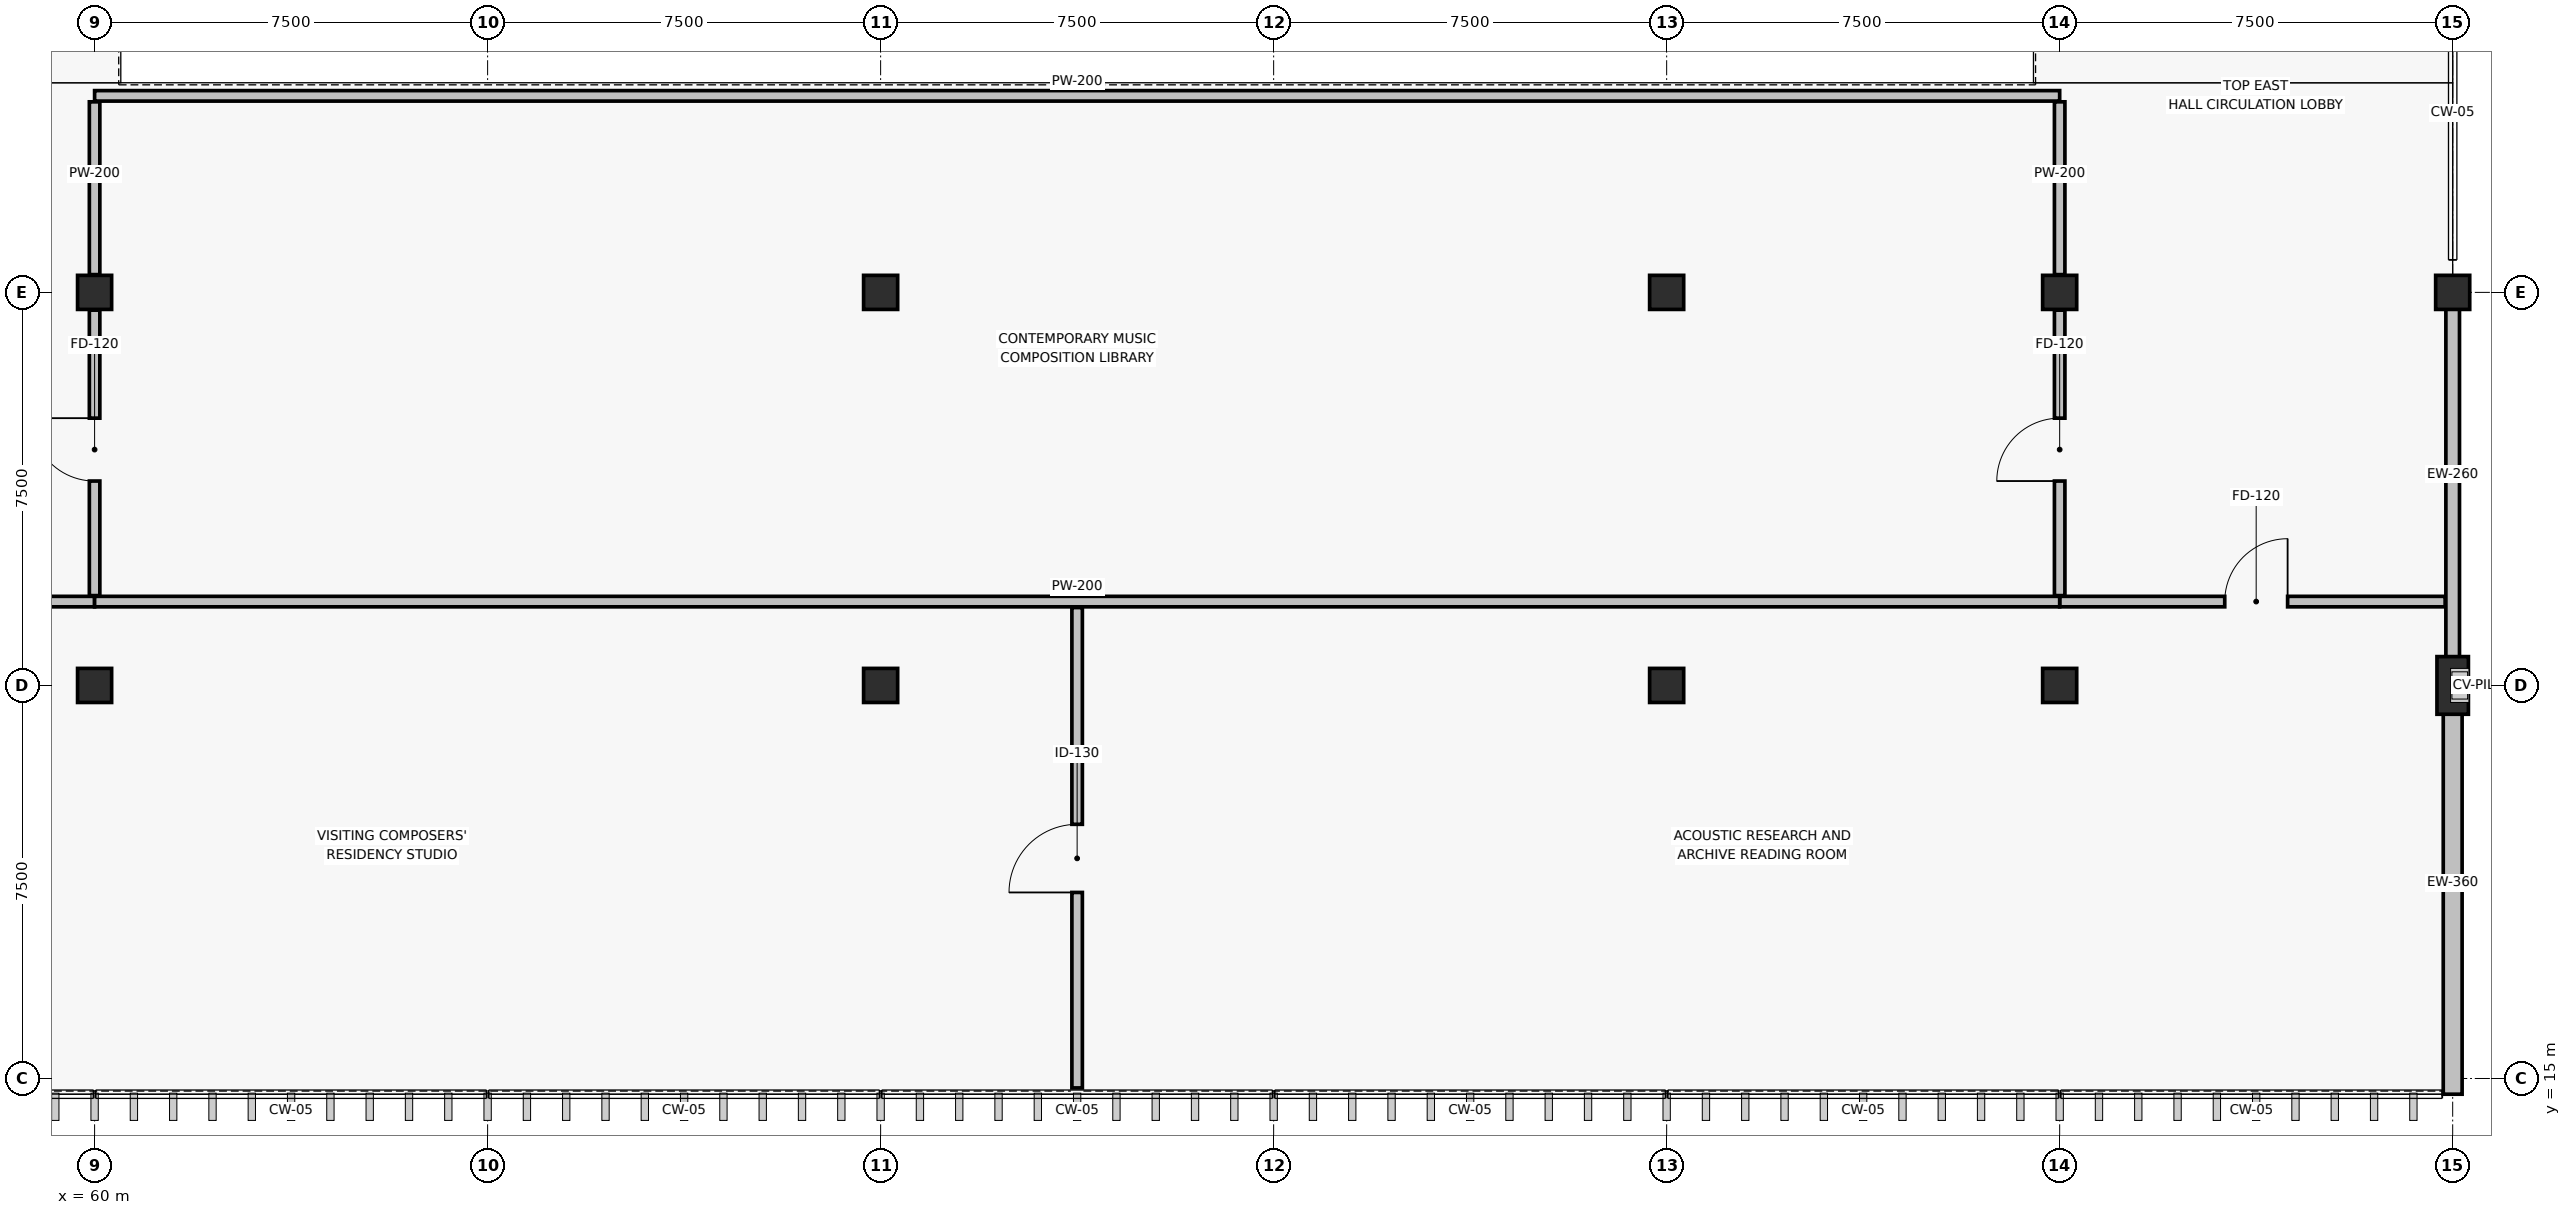
"""IFC4 building model, lengths in metres.
Left out: names, types, materials, properties, quantities, classifications, styles, units other than length and angle.
Written with IfcOpenShell. Run it as: python <this file> out.ifc"""

import sys

from ifc_helpers import new_model, si_unit, direction, frame, frame_2d, origin, origin_2d, place, context, subcontext, project, spatial, rectangle, extrude, element, fill, save


model = new_model("IFC4")
c1 = context("Model", 3, precision=1e-05, world=origin(), true_north=direction((0.0, 1.0)))
c2 = subcontext(c1, "Body", "Model", "MODEL_VIEW")
j1 = project(units=[si_unit("LENGTHUNIT", "METRE"), si_unit("PLANEANGLEUNIT", "RADIAN")], contexts=[c1])
p1 = place(None, origin())
s1 = spatial("IfcSite", under=j1, at=p1, CompositionType="ELEMENT")
p2 = place(p1, origin())
s2 = spatial("IfcBuilding", under=s1, at=p2, CompositionType="ELEMENT")
p3 = place(p2, frame((0.0, 0.0, 21.0)))
s3 = spatial("IfcBuildingStorey", under=s2, at=p3, CompositionType="ELEMENT", Elevation=21.0)
for number, where, z_axis, x_axis in (
    (1, (60.0, 22.5, 0.0), (0.0, 0.0, 1.0), (1.0, 0.0, 0.0)),
    (2, (60.0, 30.0, 0.0), (0.0, 0.0, 1.0), (1.0, 0.0, 0.0)),
    (3, (75.0, 22.5, 0.0), (0.0, 0.0, 1.0), (1.0, 0.0, 0.0)),
    (4, (75.0, 30.0, 0.0), (0.0, 0.0, 1.0), (1.0, 0.0, 0.0)),
    (5, (90.0, 22.5, 0.0), (0.0, 0.0, 1.0), (1.0, 0.0, 0.0)),
    (6, (90.0, 30.0, 0.0), (0.0, 0.0, 1.0), (1.0, 0.0, 0.0)),
    (7, (97.5, 22.5, 0.0), (0.0, 0.0, 1.0), (1.0, 0.0, 0.0)),
    (8, (97.5, 30.0, 0.0), (0.0, 0.0, 1.0), (1.0, 0.0, 0.0)),
):
    element("IfcColumn", number, at=place(p3, frame(where, z_axis=z_axis, x_axis=x_axis)), inside=s3, PredefinedType="COLUMN", context=c2, shape_type="SweptSolid", body=[
        extrude(rectangle(XDim=0.65, YDim=0.65, at=origin_2d()), origin(), (0.0, 0.0, 1.0), 4.2),
    ])
p4 = place(p3, frame((105.0, 22.5, 0.0), z_axis=(0.0, 0.0, 1.0), x_axis=(1.0, 0.0, 0.0)))
e9 = element("IfcColumn", 9, at=p4, inside=s3, PredefinedType="COLUMN", context=c2, shape_type="SweptSolid", body=[
    extrude(rectangle(XDim=0.6, YDim=1.1, at=origin_2d()), origin(), (0.0, 0.0, 1.0), 4.2),
])
p5 = place(p3, frame((105.0, 30.0, 0.0), z_axis=(0.0, 0.0, 1.0), x_axis=(1.0, 0.0, 0.0)))
e10 = element("IfcColumn", 10, at=p5, inside=s3, PredefinedType="COLUMN", context=c2, shape_type="SweptSolid", body=[
    extrude(rectangle(XDim=0.65, YDim=0.65, at=origin_2d()), origin(), (0.0, 0.0, 1.0), 4.2),
])
p6 = place(p3, frame((105.0, 14.7, 0.0), z_axis=(0.0, 0.0, 1.0), x_axis=(0.0, 1.0, 0.0)))
e11 = element("IfcWall", 11, at=p6, inside=s3, PredefinedType="SOLIDWALL", context=c2, shape_type="SweptSolid", body=[
    extrude(rectangle(XDim=7.5, YDim=0.36, at=frame_2d((3.75, 0.0))), origin(), (0.0, 0.0, 1.0), 3.32),
])
p7 = place(p3, frame((105.0, 22.8, 0.0), z_axis=(0.0, 0.0, 1.0), x_axis=(0.0, 1.0, 0.0)))
e12 = element("IfcWall", 12, at=p7, inside=s3, PredefinedType="SOLIDWALL", context=c2, shape_type="SweptSolid", body=[
    extrude(rectangle(XDim=6.9, YDim=0.26, at=frame_2d((3.45, 0.0))), origin(), (0.0, 0.0, 1.0), 3.04),
])
p8 = place(p3, frame((52.644, 24.1, 0.0), z_axis=(0.0, 0.0, 1.0), x_axis=(1.0, 0.0, 0.0)))
e13 = element("IfcWall", 13, at=p8, inside=s3, PredefinedType="PARTITIONING", context=c2, shape_type="SweptSolid", body=[
    extrude(rectangle(XDim=7.356, YDim=0.2, at=frame_2d((3.678, 0.0))), origin(), (0.0, 0.0, 1.0), 2.69),
])
p9 = place(p8, frame((3.006, 0.0, 0.0)))
e14 = element("IfcOpeningElement", 14, at=p9, cuts=e13, PredefinedType="OPENING", context=c2, shape_type="SweptSolid", body=[
    extrude(rectangle(XDim=1.2, YDim=2.15, at=frame_2d((0.6, 1.075))), frame((0.0, 0.11, 0.0), z_axis=(0.0, -1.0, 0.0), x_axis=(1.0, 0.0, 0.0)), (0.0, 0.0, 1.0), 0.22),
])
p10 = place(p3, frame((97.5, 24.1, 0.0), z_axis=(0.0, 0.0, 1.0), x_axis=(1.0, 0.0, 0.0)))
e15 = element("IfcWall", 15, at=p10, inside=s3, PredefinedType="PARTITIONING", context=c2, shape_type="SweptSolid", body=[
    extrude(rectangle(XDim=7.356, YDim=0.2, at=frame_2d((3.678, 0.0))), origin(), (0.0, 0.0, 1.0), 2.69),
])
p11 = place(p10, frame((3.15, 0.0, 0.0)))
e16 = element("IfcOpeningElement", 16, at=p11, cuts=e15, PredefinedType="OPENING", context=c2, shape_type="SweptSolid", body=[
    extrude(rectangle(XDim=1.2, YDim=2.15, at=frame_2d((0.6, 1.075))), frame((0.0, 0.11, 0.0), z_axis=(0.0, -1.0, 0.0), x_axis=(1.0, 0.0, 0.0)), (0.0, 0.0, 1.0), 0.22),
])
for number, where, z_axis, x_axis in (
    (17, (60.0, 24.1, 0.0), (0.0, 0.0, 1.0), (1.0, 0.0, 0.0)),
    (18, (60.0, 33.75, 0.0), (0.0, 0.0, 1.0), (1.0, 0.0, 0.0)),
):
    element("IfcWall", number, at=place(p3, frame(where, z_axis=z_axis, x_axis=x_axis)), inside=s3, PredefinedType="PARTITIONING", context=c2, shape_type="SweptSolid", body=[
        extrude(rectangle(XDim=37.5, YDim=0.2, at=frame_2d((18.75, 0.0))), origin(), (0.0, 0.0, 1.0), 2.69),
    ])
p12 = place(p3, frame((78.75, 14.82, 0.0), z_axis=(0.0, 0.0, 1.0), x_axis=(0.0, 1.0, 0.0)))
e19 = element("IfcWall", 19, at=p12, inside=s3, PredefinedType="PARTITIONING", context=c2, shape_type="SweptSolid", body=[
    extrude(rectangle(XDim=9.166, YDim=0.2, at=frame_2d((4.583, 0.0))), origin(), (0.0, 0.0, 1.0), 2.99),
])
p13 = place(p12, frame((3.73, 0.0, 0.0)))
e20 = element("IfcOpeningElement", 20, at=p13, cuts=e19, PredefinedType="OPENING", context=c2, shape_type="SweptSolid", body=[
    extrude(rectangle(XDim=1.3, YDim=2.15, at=frame_2d((0.65, 1.075))), frame((0.0, 0.11, 0.0), z_axis=(0.0, -1.0, 0.0), x_axis=(1.0, 0.0, 0.0)), (0.0, 0.0, 1.0), 0.22),
])
p14 = place(p3, frame((60.0, 24.214, 0.0), z_axis=(0.0, 0.0, 1.0), x_axis=(0.0, 1.0, 0.0)))
e21 = element("IfcWall", 21, at=p14, inside=s3, PredefinedType="PARTITIONING", context=c2, shape_type="SweptSolid", body=[
    extrude(rectangle(XDim=5.447, YDim=0.2, at=frame_2d((2.723, 0.0))), origin(), (0.0, 0.0, 1.0), 2.69),
])
p15 = place(p14, frame((2.186, 0.0, 0.0)))
e22 = element("IfcOpeningElement", 22, at=p15, cuts=e21, PredefinedType="OPENING", context=c2, shape_type="SweptSolid", body=[
    extrude(rectangle(XDim=1.2, YDim=2.15, at=frame_2d((0.6, 1.075))), frame((0.0, 0.11, 0.0), z_axis=(0.0, -1.0, 0.0), x_axis=(1.0, 0.0, 0.0)), (0.0, 0.0, 1.0), 0.22),
])
p16 = place(p3, frame((60.0, 30.339, 0.0), z_axis=(0.0, 0.0, 1.0), x_axis=(0.0, 1.0, 0.0)))
e23 = element("IfcWall", 23, at=p16, inside=s3, PredefinedType="PARTITIONING", context=c2, shape_type="SweptSolid", body=[
    extrude(rectangle(XDim=3.297, YDim=0.2, at=frame_2d((1.648, 0.0))), origin(), (0.0, 0.0, 1.0), 2.69),
])
p17 = place(p3, frame((97.5, 24.214, 0.0), z_axis=(0.0, 0.0, 1.0), x_axis=(0.0, 1.0, 0.0)))
e24 = element("IfcWall", 24, at=p17, inside=s3, PredefinedType="PARTITIONING", context=c2, shape_type="SweptSolid", body=[
    extrude(rectangle(XDim=5.447, YDim=0.2, at=frame_2d((2.723, 0.0))), origin(), (0.0, 0.0, 1.0), 2.69),
])
p18 = place(p17, frame((2.186, 0.0, 0.0)))
e25 = element("IfcOpeningElement", 25, at=p18, cuts=e24, PredefinedType="OPENING", context=c2, shape_type="SweptSolid", body=[
    extrude(rectangle(XDim=1.2, YDim=2.15, at=frame_2d((0.6, 1.075))), frame((0.0, 0.11, 0.0), z_axis=(0.0, -1.0, 0.0), x_axis=(1.0, 0.0, 0.0)), (0.0, 0.0, 1.0), 0.22),
])
p19 = place(p3, frame((97.5, 30.339, 0.0), z_axis=(0.0, 0.0, 1.0), x_axis=(0.0, 1.0, 0.0)))
e26 = element("IfcWall", 26, at=p19, inside=s3, PredefinedType="PARTITIONING", context=c2, shape_type="SweptSolid", body=[
    extrude(rectangle(XDim=3.297, YDim=0.2, at=frame_2d((1.648, 0.0))), origin(), (0.0, 0.0, 1.0), 2.69),
])
p20 = place(p11, origin())
e27 = element("IfcDoor", 27, at=p20, inside=s3, OperationType="SINGLE_SWING_RIGHT", PredefinedType="DOOR", context=c2, shape_type="SweptSolid", body=[
    extrude(rectangle(XDim=1.2, YDim=2.15, at=frame_2d((0.6, 1.075))), frame((0.0, 0.025, 0.0), z_axis=(0.0, -1.0, 0.0), x_axis=(1.0, 0.0, 0.0)), (0.0, 0.0, 1.0), 0.05),
])
fill(e16, e27)
p21 = place(p13, origin())
e28 = element("IfcDoor", 28, at=p21, inside=s3, OperationType="SINGLE_SWING_LEFT", PredefinedType="DOOR", context=c2, shape_type="SweptSolid", body=[
    extrude(rectangle(XDim=1.3, YDim=2.15, at=frame_2d((0.65, 1.075))), frame((0.0, 0.025, 0.0), z_axis=(0.0, -1.0, 0.0), x_axis=(1.0, 0.0, 0.0)), (0.0, 0.0, 1.0), 0.05),
])
fill(e20, e28)
p22 = place(p15, origin())
e29 = element("IfcDoor", 29, at=p22, inside=s3, OperationType="SINGLE_SWING_RIGHT", PredefinedType="DOOR", context=c2, shape_type="SweptSolid", body=[
    extrude(rectangle(XDim=1.2, YDim=2.15, at=frame_2d((0.6, 1.075))), frame((0.0, 0.025, 0.0), z_axis=(0.0, -1.0, 0.0), x_axis=(1.0, 0.0, 0.0)), (0.0, 0.0, 1.0), 0.05),
])
fill(e22, e29)
p23 = place(p18, origin())
e30 = element("IfcDoor", 30, at=p23, inside=s3, OperationType="SINGLE_SWING_LEFT", PredefinedType="DOOR", context=c2, shape_type="SweptSolid", body=[
    extrude(rectangle(XDim=1.2, YDim=2.15, at=frame_2d((0.6, 1.075))), frame((0.0, 0.025, 0.0), z_axis=(0.0, -1.0, 0.0), x_axis=(1.0, 0.0, 0.0)), (0.0, 0.0, 1.0), 0.05),
])
fill(e25, e30)
save(model, sys.argv[1])
